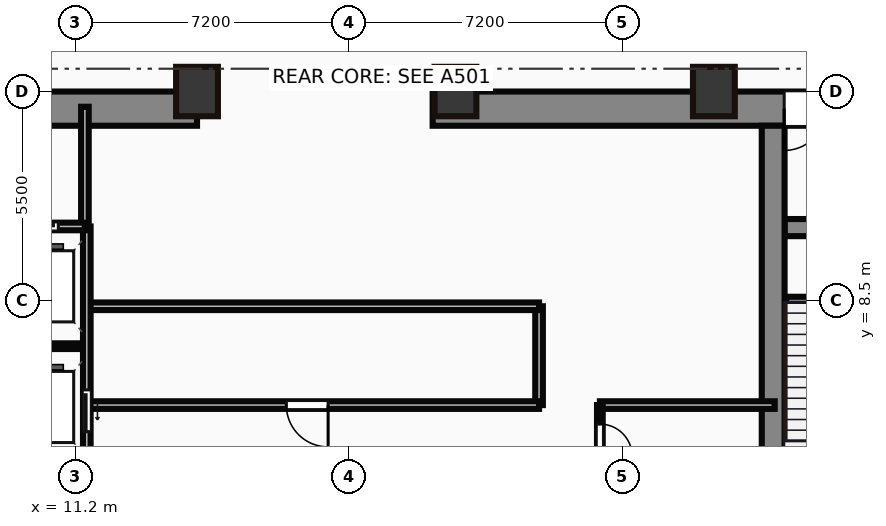
"""IFC4 building model, lengths in metres.
Left out: names, types, materials, properties, quantities, classifications, styles, units other than length and angle.
Written with IfcOpenShell. Run it as: python <this file> out.ifc"""

import sys

from ifc_helpers import new_model, si_unit, direction, frame, frame_2d, origin, origin_2d, place, context, subcontext, project, spatial, rectangle, hollow_rectangle, extrude, source, transform, mapped, element, fill, save


model = new_model("IFC4")
c1 = context("Model", 3, precision=1e-05, world=origin(), true_north=direction((0.0, 1.0)))
c2 = subcontext(c1, "Body", "Model", "MODEL_VIEW")
j1 = project(units=[si_unit("LENGTHUNIT", "METRE"), si_unit("PLANEANGLEUNIT", "RADIAN")], contexts=[c1])
p1 = place(None, origin())
s1 = spatial("IfcSite", under=j1, at=p1, CompositionType="ELEMENT")
p2 = place(p1, origin())
s2 = spatial("IfcBuilding", under=s1, at=p2, CompositionType="ELEMENT")
p3 = place(p2, frame((0.0, 0.0, -10.0)))
s3 = spatial("IfcBuildingStorey", under=s2, at=p3, CompositionType="ELEMENT", Elevation=-10.0)
m1 = source(origin(), c2, "Body", "SweptSolid", [
    extrude(rectangle(XDim=9.1, YDim=0.9, at=frame_2d((4.55, 0.0))), origin(), (0.0, 0.0, 1.0), 4.55),
])
p4 = place(p3, frame((5.3, 13.55, 0.45), z_axis=(0.0, 0.0, 1.0), x_axis=(1.0, 0.0, 0.0)))
e1 = element("IfcWall", 1, at=p4, inside=s3, PredefinedType="SHEAR", context=c2, shape_type="MappedRepresentation", body=[
    mapped(m1, transform((0.0, 0.0, 0.0))),
])
p5 = place(p4, frame((4.1, 0.0, 0.0)))
e2 = element("IfcOpeningElement", 2, at=p5, cuts=e1, PredefinedType="OPENING", context=c2, shape_type="SweptSolid", body=[
    extrude(rectangle(XDim=1.1, YDim=2.15, at=frame_2d((0.55, 1.075))), frame((0.0, 0.46, 0.0), z_axis=(0.0, -1.0, 0.0), x_axis=(1.0, 0.0, 0.0)), (0.0, 0.0, 1.0), 0.92),
])
m2 = source(origin(), c2, "Body", "SweptSolid", [
    extrude(rectangle(XDim=12.6, YDim=0.9, at=frame_2d((6.3, 0.0))), origin(), (0.0, 0.0, 1.0), 4.55),
])
p6 = place(p3, frame((20.6, 13.55, 0.45), z_axis=(0.0, 0.0, 1.0), x_axis=(1.0, 0.0, 0.0)))
e3 = element("IfcWall", 3, at=p6, inside=s3, PredefinedType="SHEAR", context=c2, shape_type="MappedRepresentation", body=[
    mapped(m2, transform((0.0, 0.0, 0.0))),
])
p7 = place(p6, frame((9.25, 0.0, 0.0)))
e4 = element("IfcOpeningElement", 4, at=p7, cuts=e3, PredefinedType="OPENING", context=c2, shape_type="SweptSolid", body=[
    extrude(rectangle(XDim=1.1, YDim=2.15, at=frame_2d((0.55, 1.075))), frame((0.0, 0.46, 0.0), z_axis=(0.0, -1.0, 0.0), x_axis=(1.0, 0.0, 0.0)), (0.0, 0.0, 1.0), 0.92),
])
m3 = source(origin(), c2, "Body", "SweptSolid", [
    extrude(rectangle(XDim=12.2, YDim=0.6, at=frame_2d((6.1, 0.0))), origin(), (0.0, 0.0, 1.0), 5.0),
])
p8 = place(p3, frame((29.56, 0.9, 0.0), z_axis=(0.0, 0.0, 1.0), x_axis=(0.0, 1.0, 0.0)))
e5 = element("IfcWall", 5, at=p8, inside=s3, PredefinedType="SHEAR", context=c2, shape_type="MappedRepresentation", body=[
    mapped(m3, transform((0.0, 0.0, 0.0))),
])
m4 = source(origin(), c2, "Body", "SweptSolid", [
    extrude(rectangle(XDim=3.39, YDim=0.45, at=frame_2d((1.695, 0.0))), origin(), (0.0, 0.0, 1.0), 4.55),
])
p9 = place(p3, frame((29.86, 10.42, 0.45), z_axis=(0.0, 0.0, 1.0), x_axis=(1.0, 0.0, 0.0)))
e6 = element("IfcWall", 6, at=p9, inside=s3, PredefinedType="SHEAR", context=c2, shape_type="MappedRepresentation", body=[
    mapped(m4, transform((0.0, 0.0, 0.0))),
])
p10 = place(p9, frame((1.1, 0.0, 0.0)))
e7 = element("IfcOpeningElement", 7, at=p10, cuts=e6, PredefinedType="OPENING", context=c2, shape_type="SweptSolid", body=[
    extrude(rectangle(XDim=1.1, YDim=2.15, at=frame_2d((0.55, 1.075))), frame((0.0, 0.235, 0.0), z_axis=(0.0, -1.0, 0.0), x_axis=(1.0, 0.0, 0.0)), (0.0, 0.0, 1.0), 0.47),
])
m5 = source(origin(), c2, "Body", "SweptSolid", [
    extrude(rectangle(XDim=3.4, YDim=0.3, at=frame_2d((1.7, 0.0))), origin(), (0.0, 0.0, 1.0), 0.75),
])
p11 = place(p3, frame((29.9, 8.45, -0.3), z_axis=(0.0, 0.0, 1.0), x_axis=(1.0, 0.0, 0.0)))
e8 = element("IfcWall", 8, at=p11, inside=s3, PredefinedType="SHEAR", context=c2, shape_type="MappedRepresentation", body=[
    mapped(m5, transform((0.0, 0.0, 0.0))),
])
m6 = source(origin(), c2, "Body", "SweptSolid", [
    extrude(hollow_rectangle(XDim=1.1, YDim=1.3, WallThickness=0.055, at=origin_2d()), origin(), (0.0, 0.0, 1.0), 5.0),
])
for number, where, z_axis, x_axis in (
    (9, (14.4, 14.0, 0.0), (0.0, 0.0, 1.0), (1.0, 0.0, 0.0)),
    (10, (21.2, 14.0, 0.0), (0.0, 0.0, 1.0), (1.0, 0.0, 0.0)),
    (11, (28.0, 14.0, 0.0), (0.0, 0.0, 1.0), (1.0, 0.0, 0.0)),
):
    element("IfcColumn", number, at=place(p3, frame(where, z_axis=z_axis, x_axis=x_axis)), inside=s3, PredefinedType="PILASTER", context=c2, shape_type="MappedRepresentation", body=[
        mapped(m6, transform((0.0, 0.0, 0.0))),
    ])
m7 = source(origin(), c2, "Body", "SweptSolid", [
    extrude(rectangle(XDim=3.18, YDim=0.2, at=frame_2d((1.59, 0.0))), origin(), (0.0, 0.0, 1.0), 4.25),
])
p12 = place(p3, frame((11.45, 10.42, 0.45), z_axis=(0.0, 0.0, 1.0), x_axis=(0.0, 1.0, 0.0)))
e12 = element("IfcWall", 12, at=p12, inside=s3, PredefinedType="PARTITIONING", context=c2, shape_type="MappedRepresentation", body=[
    mapped(m7, transform((0.0, 0.0, 0.0))),
])
m8 = source(origin(), c2, "Body", "SweptSolid", [
    extrude(rectangle(XDim=2.35, YDim=0.2, at=frame_2d((1.175, 0.0))), origin(), (0.0, 0.0, 1.0), 4.25),
])
p13 = place(p3, frame((9.1, 10.45, 0.45), z_axis=(0.0, 0.0, 1.0), x_axis=(1.0, 0.0, 0.0)))
e13 = element("IfcWall", 13, at=p13, inside=s3, PredefinedType="PARTITIONING", context=c2, shape_type="MappedRepresentation", body=[
    mapped(m8, transform((0.0, 0.0, 0.0))),
])
p14 = place(p13, frame((0.55, 0.0, 0.0)))
e14 = element("IfcOpeningElement", 14, at=p14, cuts=e13, PredefinedType="OPENING", context=c2, shape_type="SweptSolid", body=[
    extrude(rectangle(XDim=1.1, YDim=2.15, at=frame_2d((0.55, 1.075))), frame((0.0, 0.11, 0.0), z_axis=(0.0, -1.0, 0.0), x_axis=(1.0, 0.0, 0.0)), (0.0, 0.0, 1.0), 0.22),
])
m9 = source(origin(), c2, "Body", "SweptSolid", [
    extrude(rectangle(XDim=9.6, YDim=0.2, at=frame_2d((4.8, 0.0))), origin(), (0.0, 0.0, 1.0), 4.25),
])
p15 = place(p3, frame((11.5, 0.85, 0.45), z_axis=(0.0, 0.0, 1.0), x_axis=(0.0, 1.0, 0.0)))
e15 = element("IfcWall", 15, at=p15, inside=s3, PredefinedType="PARTITIONING", context=c2, shape_type="MappedRepresentation", body=[
    mapped(m9, transform((0.0, 0.0, 0.0))),
])
p16 = place(p15, frame((4.2, 0.0, 0.0)))
e16 = element("IfcOpeningElement", 16, at=p16, cuts=e15, PredefinedType="OPENING", context=c2, shape_type="SweptSolid", body=[
    extrude(rectangle(XDim=1.1, YDim=2.15, at=frame_2d((0.55, 1.075))), frame((0.0, 0.11, 0.0), z_axis=(0.0, -1.0, 0.0), x_axis=(1.0, 0.0, 0.0)), (0.0, 0.0, 1.0), 0.22),
])
p17 = place(p15, frame((0.9, 0.0, 0.0)))
e17 = element("IfcOpeningElement", 17, at=p17, cuts=e15, PredefinedType="OPENING", context=c2, shape_type="SweptSolid", body=[
    extrude(rectangle(XDim=1.2, YDim=2.15, at=frame_2d((0.6, 1.075))), frame((0.0, 0.11, 0.0), z_axis=(0.0, -1.0, 0.0), x_axis=(1.0, 0.0, 0.0)), (0.0, 0.0, 1.0), 0.22),
])
m10 = source(origin(), c2, "Body", "SweptSolid", [
    extrude(rectangle(XDim=2.4, YDim=0.15, at=frame_2d((1.2, 0.0))), origin(), (0.0, 0.0, 1.0), 4.25),
])
p18 = place(p3, frame((9.1, 7.3, 0.45), z_axis=(0.0, 0.0, 1.0), x_axis=(1.0, 0.0, 0.0)))
e18 = element("IfcWall", 18, at=p18, inside=s3, PredefinedType="PARTITIONING", context=c2, shape_type="MappedRepresentation", body=[
    mapped(m10, transform((0.0, 0.0, 0.0))),
])
m11 = source(origin(), c2, "Body", "SweptSolid", [
    extrude(rectangle(XDim=11.85, YDim=0.2, at=frame_2d((5.925, 0.0))), origin(), (0.0, 0.0, 1.0), 4.25),
])
p19 = place(p3, frame((11.55, 5.75, 0.45), z_axis=(0.0, 0.0, 1.0), x_axis=(1.0, 0.0, 0.0)))
e19 = element("IfcWall", 19, at=p19, inside=s3, PredefinedType="PARTITIONING", context=c2, shape_type="MappedRepresentation", body=[
    mapped(m11, transform((0.0, 0.0, 0.0))),
])
p20 = place(p19, frame((5.2, 0.0, 0.0)))
e20 = element("IfcOpeningElement", 20, at=p20, cuts=e19, PredefinedType="OPENING", context=c2, shape_type="SweptSolid", body=[
    extrude(rectangle(XDim=1.1, YDim=2.15, at=frame_2d((0.55, 1.075))), frame((0.0, 0.11, 0.0), z_axis=(0.0, -1.0, 0.0), x_axis=(1.0, 0.0, 0.0)), (0.0, 0.0, 1.0), 0.22),
])
p21 = place(p3, frame((11.55, 8.35, 0.45), z_axis=(0.0, 0.0, 1.0), x_axis=(1.0, 0.0, 0.0)))
e21 = element("IfcWall", 21, at=p21, inside=s3, PredefinedType="PARTITIONING", context=c2, shape_type="MappedRepresentation", body=[
    mapped(m11, transform((0.0, 0.0, 0.0))),
])
m12 = source(origin(), c2, "Body", "SweptSolid", [
    extrude(rectangle(XDim=2.6, YDim=0.2, at=frame_2d((1.3, 0.0))), origin(), (0.0, 0.0, 1.0), 4.25),
])
p22 = place(p3, frame((23.4, 5.75, 0.45), z_axis=(0.0, 0.0, 1.0), x_axis=(0.0, 1.0, 0.0)))
e22 = element("IfcWall", 22, at=p22, inside=s3, PredefinedType="PARTITIONING", context=c2, shape_type="MappedRepresentation", body=[
    mapped(m12, transform((0.0, 0.0, 0.0))),
])
m13 = source(origin(), c2, "Body", "SweptSolid", [
    extrude(rectangle(XDim=4.9, YDim=0.15, at=frame_2d((2.45, 0.0))), origin(), (0.0, 0.0, 1.0), 4.25),
])
p23 = place(p3, frame((25.0, 0.85, 0.45), z_axis=(0.0, 0.0, 1.0), x_axis=(0.0, 1.0, 0.0)))
e23 = element("IfcWall", 23, at=p23, inside=s3, PredefinedType="PARTITIONING", context=c2, shape_type="MappedRepresentation", body=[
    mapped(m13, transform((0.0, 0.0, 0.0))),
])
p24 = place(p23, frame((1.85, 0.0, 0.0)))
e24 = element("IfcOpeningElement", 24, at=p24, cuts=e23, PredefinedType="OPENING", context=c2, shape_type="SweptSolid", body=[
    extrude(rectangle(XDim=0.95, YDim=2.15, at=frame_2d((0.475, 1.075))), frame((0.0, 0.085, 0.0), z_axis=(0.0, -1.0, 0.0), x_axis=(1.0, 0.0, 0.0)), (0.0, 0.0, 1.0), 0.17),
])
p25 = place(p23, frame((3.55, 0.0, 0.0)))
e25 = element("IfcOpeningElement", 25, at=p25, cuts=e23, PredefinedType="OPENING", context=c2, shape_type="SweptSolid", body=[
    extrude(rectangle(XDim=0.85, YDim=2.15, at=frame_2d((0.425, 1.075))), frame((0.0, 0.085, 0.0), z_axis=(0.0, -1.0, 0.0), x_axis=(1.0, 0.0, 0.0)), (0.0, 0.0, 1.0), 0.17),
])
m14 = source(origin(), c2, "Body", "SweptSolid", [
    extrude(rectangle(XDim=4.6, YDim=0.2, at=frame_2d((2.3, 0.0))), origin(), (0.0, 0.0, 1.0), 4.25),
])
p26 = place(p3, frame((25.0, 5.75, 0.45), z_axis=(0.0, 0.0, 1.0), x_axis=(1.0, 0.0, 0.0)))
e26 = element("IfcWall", 26, at=p26, inside=s3, PredefinedType="PARTITIONING", context=c2, shape_type="MappedRepresentation", body=[
    mapped(m14, transform((0.0, 0.0, 0.0))),
])
m15 = source(origin(), c2, "Body", "SweptSolid", [
    extrude(rectangle(XDim=1.1, YDim=2.15, at=frame_2d((0.55, 1.075))), frame((0.0, 0.025, 0.0), z_axis=(0.0, -1.0, 0.0), x_axis=(1.0, 0.0, 0.0)), (0.0, 0.0, 1.0), 0.05),
])
p27 = place(p7, origin())
e27 = element("IfcDoor", 27, at=p27, inside=s3, OperationType="SINGLE_SWING_LEFT", PredefinedType="DOOR", context=c2, shape_type="MappedRepresentation", body=[
    mapped(m15, transform((0.0, 0.0, 0.0))),
])
fill(e4, e27)
p28 = place(p14, origin())
e28 = element("IfcDoor", 28, at=p28, inside=s3, OperationType="SLIDING_TO_LEFT", PredefinedType="DOOR", context=c2, shape_type="MappedRepresentation", body=[
    mapped(m15, transform((0.0, 0.0, 0.0))),
])
fill(e14, e28)
p29 = place(p16, frame((1.1, 0.0, 0.0), z_axis=(0.0, 0.0, 1.0), x_axis=(-1.0, 0.0, 0.0)))
e29 = element("IfcDoor", 29, at=p29, inside=s3, OperationType="SLIDING_TO_LEFT", PredefinedType="DOOR", context=c2, shape_type="MappedRepresentation", body=[
    mapped(m15, transform((0.0, 0.0, 0.0))),
])
fill(e16, e29)
p30 = place(p20, frame((1.1, 0.0, 0.0), z_axis=(0.0, 0.0, 1.0), x_axis=(-1.0, 0.0, 0.0)))
e30 = element("IfcDoor", 30, at=p30, inside=s3, OperationType="SINGLE_SWING_RIGHT", PredefinedType="DOOR", context=c2, shape_type="MappedRepresentation", body=[
    mapped(m15, transform((0.0, 0.0, 0.0))),
])
fill(e20, e30)
m16 = source(origin(), c2, "Body", "SweptSolid", [
    extrude(rectangle(XDim=0.85, YDim=2.15, at=frame_2d((0.425, 1.075))), frame((0.0, 0.025, 0.0), z_axis=(0.0, -1.0, 0.0), x_axis=(1.0, 0.0, 0.0)), (0.0, 0.0, 1.0), 0.05),
])
p31 = place(p25, origin())
e31 = element("IfcDoor", 31, at=p31, inside=s3, OperationType="SINGLE_SWING_LEFT", PredefinedType="DOOR", context=c2, shape_type="MappedRepresentation", body=[
    mapped(m16, transform((0.0, 0.0, 0.0))),
])
fill(e25, e31)
save(model, sys.argv[1])
